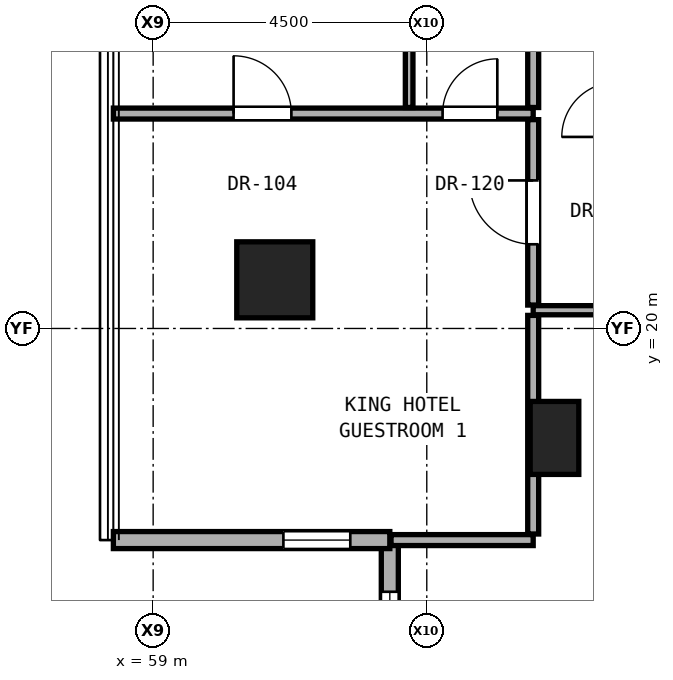
"""IFC4 building model, lengths in metres.
Left out: names, types, materials, properties, quantities, classifications, styles, units other than length and angle.
Written with IfcOpenShell. Run it as: python <this file> out.ifc"""

import sys

from ifc_helpers import new_model, si_unit, direction, frame, frame_2d, origin, origin_2d, place, context, subcontext, project, spatial, rectangle, hollow_rectangle, extrude, element, fill, save


model = new_model("IFC4")
c1 = context("Model", 3, precision=1e-05, world=origin(), true_north=direction((0.0, 1.0)))
c2 = subcontext(c1, "Body", "Model", "MODEL_VIEW")
j1 = project(units=[si_unit("LENGTHUNIT", "METRE"), si_unit("PLANEANGLEUNIT", "RADIAN")], contexts=[c1])
p1 = place(None, origin())
s1 = spatial("IfcSite", under=j1, at=p1, CompositionType="ELEMENT")
p2 = place(p1, origin())
s2 = spatial("IfcBuilding", under=s1, at=p2, CompositionType="ELEMENT")
p3 = place(p2, frame((0.0, 0.0, 62.0)))
s3 = spatial("IfcBuildingStorey", under=s2, at=p3, CompositionType="ELEMENT", Elevation=62.0)
p4 = place(p3, frame((61.0, 20.8, 0.0), z_axis=(0.0, 0.0, 1.0), x_axis=(1.0, 0.0, 0.0)))
e1 = element("IfcColumn", 1, at=p4, inside=s3, PredefinedType="COLUMN", context=c2, shape_type="SweptSolid", body=[
    extrude(hollow_rectangle(XDim=1.25, YDim=1.25, WallThickness=0.07, at=origin_2d()), origin(), (0.0, 0.0, 1.0), 3.3),
])
p5 = place(p3, frame((65.6, 18.2, 0.0), z_axis=(0.0, 0.0, 1.0), x_axis=(1.0, 0.0, 0.0)))
e2 = element("IfcColumn", 2, at=p5, inside=s3, PredefinedType="PILASTER", context=c2, shape_type="SweptSolid", body=[
    extrude(rectangle(XDim=0.8, YDim=1.2, at=origin_2d()), origin(), (0.0, 0.0, 1.0), 3.3),
])
p6 = place(p3, frame((62.892, 16.52, 0.0), z_axis=(0.0, 0.0, 1.0), x_axis=(0.0, -1.0, 0.0)))
e3 = element("IfcWall", 3, at=p6, inside=s3, PredefinedType="SOLIDWALL", context=c2, shape_type="SweptSolid", body=[
    extrude(rectangle(XDim=4.546, YDim=0.28, at=frame_2d((2.273, 0.0))), origin(), (0.0, 0.0, 1.0), 3.04),
])
p7 = place(p6, frame((0.85, 0.0, 0.79)))
e4 = element("IfcOpeningElement", 4, at=p7, cuts=e3, PredefinedType="OPENING", context=c2, shape_type="SweptSolid", body=[
    extrude(rectangle(XDim=1.2, YDim=2.1, at=frame_2d((0.6, 1.05))), frame((0.0, 0.15, 0.0), z_axis=(0.0, -1.0, 0.0), x_axis=(1.0, 0.0, 0.0)), (0.0, 0.0, 1.0), 0.3),
])
p8 = place(p3, frame((58.346, 16.52, 0.0), z_axis=(0.0, 0.0, 1.0), x_axis=(1.0, 0.0, 0.0)))
e5 = element("IfcWall", 5, at=p8, inside=s3, PredefinedType="SOLIDWALL", context=c2, shape_type="SweptSolid", body=[
    extrude(rectangle(XDim=4.546, YDim=0.28, at=frame_2d((2.273, 0.0))), origin(), (0.0, 0.0, 1.0), 3.04),
])
p9 = place(p8, frame((2.796, 0.0, 0.85)))
e6 = element("IfcOpeningElement", 6, at=p9, cuts=e5, PredefinedType="OPENING", context=c2, shape_type="SweptSolid", body=[
    extrude(rectangle(XDim=1.1, YDim=2.0, at=frame_2d((0.55, 1.0))), frame((0.0, 0.15, 0.0), z_axis=(0.0, -1.0, 0.0), x_axis=(1.0, 0.0, 0.0)), (0.0, 0.0, 1.0), 0.3),
])
p10 = place(p3, frame((62.912, 16.52, 0.0), z_axis=(0.0, 0.0, 1.0), x_axis=(1.0, 0.0, 0.0)))
e7 = element("IfcWall", 7, at=p10, inside=s3, PredefinedType="PARTITIONING", context=c2, shape_type="SweptSolid", body=[
    extrude(rectangle(XDim=2.338, YDim=0.18, at=frame_2d((1.169, 0.0))), origin(), (0.0, 0.0, 1.0), 3.06),
])
p11 = place(p3, frame((65.25, 20.3, 0.0), z_axis=(0.0, 0.0, 1.0), x_axis=(1.0, 0.0, 0.0)))
e8 = element("IfcWall", 8, at=p11, inside=s3, PredefinedType="PARTITIONING", context=c2, shape_type="SweptSolid", body=[
    extrude(rectangle(XDim=1.37, YDim=0.15, at=frame_2d((0.685, 0.0))), origin(), (0.0, 0.0, 1.0), 3.06),
])
p12 = place(p3, frame((58.346, 23.534, 0.0), z_axis=(0.0, 0.0, 1.0), x_axis=(1.0, 0.0, 0.0)))
e9 = element("IfcWall", 9, at=p12, inside=s3, PredefinedType="PARTITIONING", context=c2, shape_type="SweptSolid", body=[
    extrude(rectangle(XDim=6.904, YDim=0.18, at=frame_2d((3.452, 0.0))), origin(), (0.0, 0.0, 1.0), 2.196),
])
p13 = place(p12, frame((1.977, 0.0, 0.0)))
e10 = element("IfcOpeningElement", 10, at=p13, cuts=e9, PredefinedType="OPENING", context=c2, shape_type="SweptSolid", body=[
    extrude(rectangle(XDim=0.95, YDim=2.15, at=frame_2d((0.475, 1.075))), frame((0.0, 0.1, 0.0), z_axis=(0.0, -1.0, 0.0), x_axis=(1.0, 0.0, 0.0)), (0.0, 0.0, 1.0), 0.2),
])
p14 = place(p12, frame((5.414, 0.0, 0.0)))
e11 = element("IfcOpeningElement", 11, at=p14, cuts=e9, PredefinedType="OPENING", context=c2, shape_type="SweptSolid", body=[
    extrude(rectangle(XDim=0.9, YDim=2.1, at=frame_2d((0.45, 1.05))), frame((0.0, 0.1, 0.0), z_axis=(0.0, -1.0, 0.0), x_axis=(1.0, 0.0, 0.0)), (0.0, 0.0, 1.0), 0.2),
])
p15 = place(p3, frame((63.21, 23.634, 0.0), z_axis=(0.0, 0.0, 1.0), x_axis=(0.0, 1.0, 0.0)))
e12 = element("IfcWall", 12, at=p15, inside=s3, PredefinedType="PARTITIONING", context=c2, shape_type="SweptSolid", body=[
    extrude(rectangle(XDim=2.115, YDim=0.125, at=frame_2d((1.058, 0.0))), origin(), (0.0, 0.0, 1.0), 3.06),
])
p16 = place(p3, frame((65.25, 16.62, 0.0), z_axis=(0.0, 0.0, 1.0), x_axis=(0.0, 1.0, 0.0)))
e13 = element("IfcWall", 13, at=p16, inside=s3, PredefinedType="PARTITIONING", context=c2, shape_type="SweptSolid", body=[
    extrude(rectangle(XDim=3.595, YDim=0.18, at=frame_2d((1.797, 0.0))), origin(), (0.0, 0.0, 1.0), 2.436),
])
p17 = place(p3, frame((65.25, 20.385, 0.0), z_axis=(0.0, 0.0, 1.0), x_axis=(0.0, 1.0, 0.0)))
e14 = element("IfcWall", 14, at=p17, inside=s3, PredefinedType="PARTITIONING", context=c2, shape_type="SweptSolid", body=[
    extrude(rectangle(XDim=3.049, YDim=0.18, at=frame_2d((1.524, 0.0))), origin(), (0.0, 0.0, 1.0), 2.452),
])
p18 = place(p17, frame((1.0, 0.0, 0.0)))
e15 = element("IfcOpeningElement", 15, at=p18, cuts=e14, PredefinedType="OPENING", context=c2, shape_type="SweptSolid", body=[
    extrude(rectangle(XDim=1.05, YDim=2.2, at=frame_2d((0.525, 1.1))), frame((0.0, 0.1, 0.0), z_axis=(0.0, -1.0, 0.0), x_axis=(1.0, 0.0, 0.0)), (0.0, 0.0, 1.0), 0.2),
])
p19 = place(p3, frame((65.25, 23.634, 0.0), z_axis=(0.0, 0.0, 1.0), x_axis=(0.0, 1.0, 0.0)))
e16 = element("IfcWall", 16, at=p19, inside=s3, PredefinedType="PARTITIONING", context=c2, shape_type="SweptSolid", body=[
    extrude(rectangle(XDim=2.115, YDim=0.18, at=frame_2d((1.058, 0.0))), origin(), (0.0, 0.0, 1.0), 3.06),
])
p20 = place(p7, origin())
e17 = element("IfcWindow", 17, at=p20, inside=s3, PartitioningType="SINGLE_PANEL", PredefinedType="WINDOW", context=c2, shape_type="SweptSolid", body=[
    extrude(rectangle(XDim=1.2, YDim=2.1, at=frame_2d((0.6, 1.05))), frame((0.0, 0.03, 0.0), z_axis=(0.0, -1.0, 0.0), x_axis=(1.0, 0.0, 0.0)), (0.0, 0.0, 1.0), 0.06),
])
fill(e4, e17)
p21 = place(p9, origin())
e18 = element("IfcWindow", 18, at=p21, inside=s3, PartitioningType="SINGLE_PANEL", PredefinedType="WINDOW", context=c2, shape_type="SweptSolid", body=[
    extrude(rectangle(XDim=1.1, YDim=2.0, at=frame_2d((0.55, 1.0))), frame((0.0, 0.03, 0.0), z_axis=(0.0, -1.0, 0.0), x_axis=(1.0, 0.0, 0.0)), (0.0, 0.0, 1.0), 0.06),
])
fill(e6, e18)
p22 = place(p18, origin())
e19 = element("IfcDoor", 19, at=p22, inside=s3, OperationType="SINGLE_SWING_RIGHT", PredefinedType="DOOR", context=c2, shape_type="SweptSolid", body=[
    extrude(rectangle(XDim=1.05, YDim=2.2, at=frame_2d((0.525, 1.1))), frame((0.0, 0.025, 0.0), z_axis=(0.0, -1.0, 0.0), x_axis=(1.0, 0.0, 0.0)), (0.0, 0.0, 1.0), 0.05),
])
fill(e15, e19)
p23 = place(p13, origin())
e20 = element("IfcDoor", 20, at=p23, inside=s3, OperationType="SINGLE_SWING_LEFT", PredefinedType="DOOR", context=c2, shape_type="SweptSolid", body=[
    extrude(rectangle(XDim=0.95, YDim=2.15, at=frame_2d((0.475, 1.075))), frame((0.0, 0.025, 0.0), z_axis=(0.0, -1.0, 0.0), x_axis=(1.0, 0.0, 0.0)), (0.0, 0.0, 1.0), 0.05),
])
fill(e10, e20)
p24 = place(p14, origin())
e21 = element("IfcDoor", 21, at=p24, inside=s3, OperationType="SINGLE_SWING_RIGHT", PredefinedType="DOOR", context=c2, shape_type="SweptSolid", body=[
    extrude(rectangle(XDim=0.9, YDim=2.1, at=frame_2d((0.45, 1.05))), frame((0.0, 0.025, 0.0), z_axis=(0.0, -1.0, 0.0), x_axis=(1.0, 0.0, 0.0)), (0.0, 0.0, 1.0), 0.05),
])
fill(e11, e21)
save(model, sys.argv[1])
